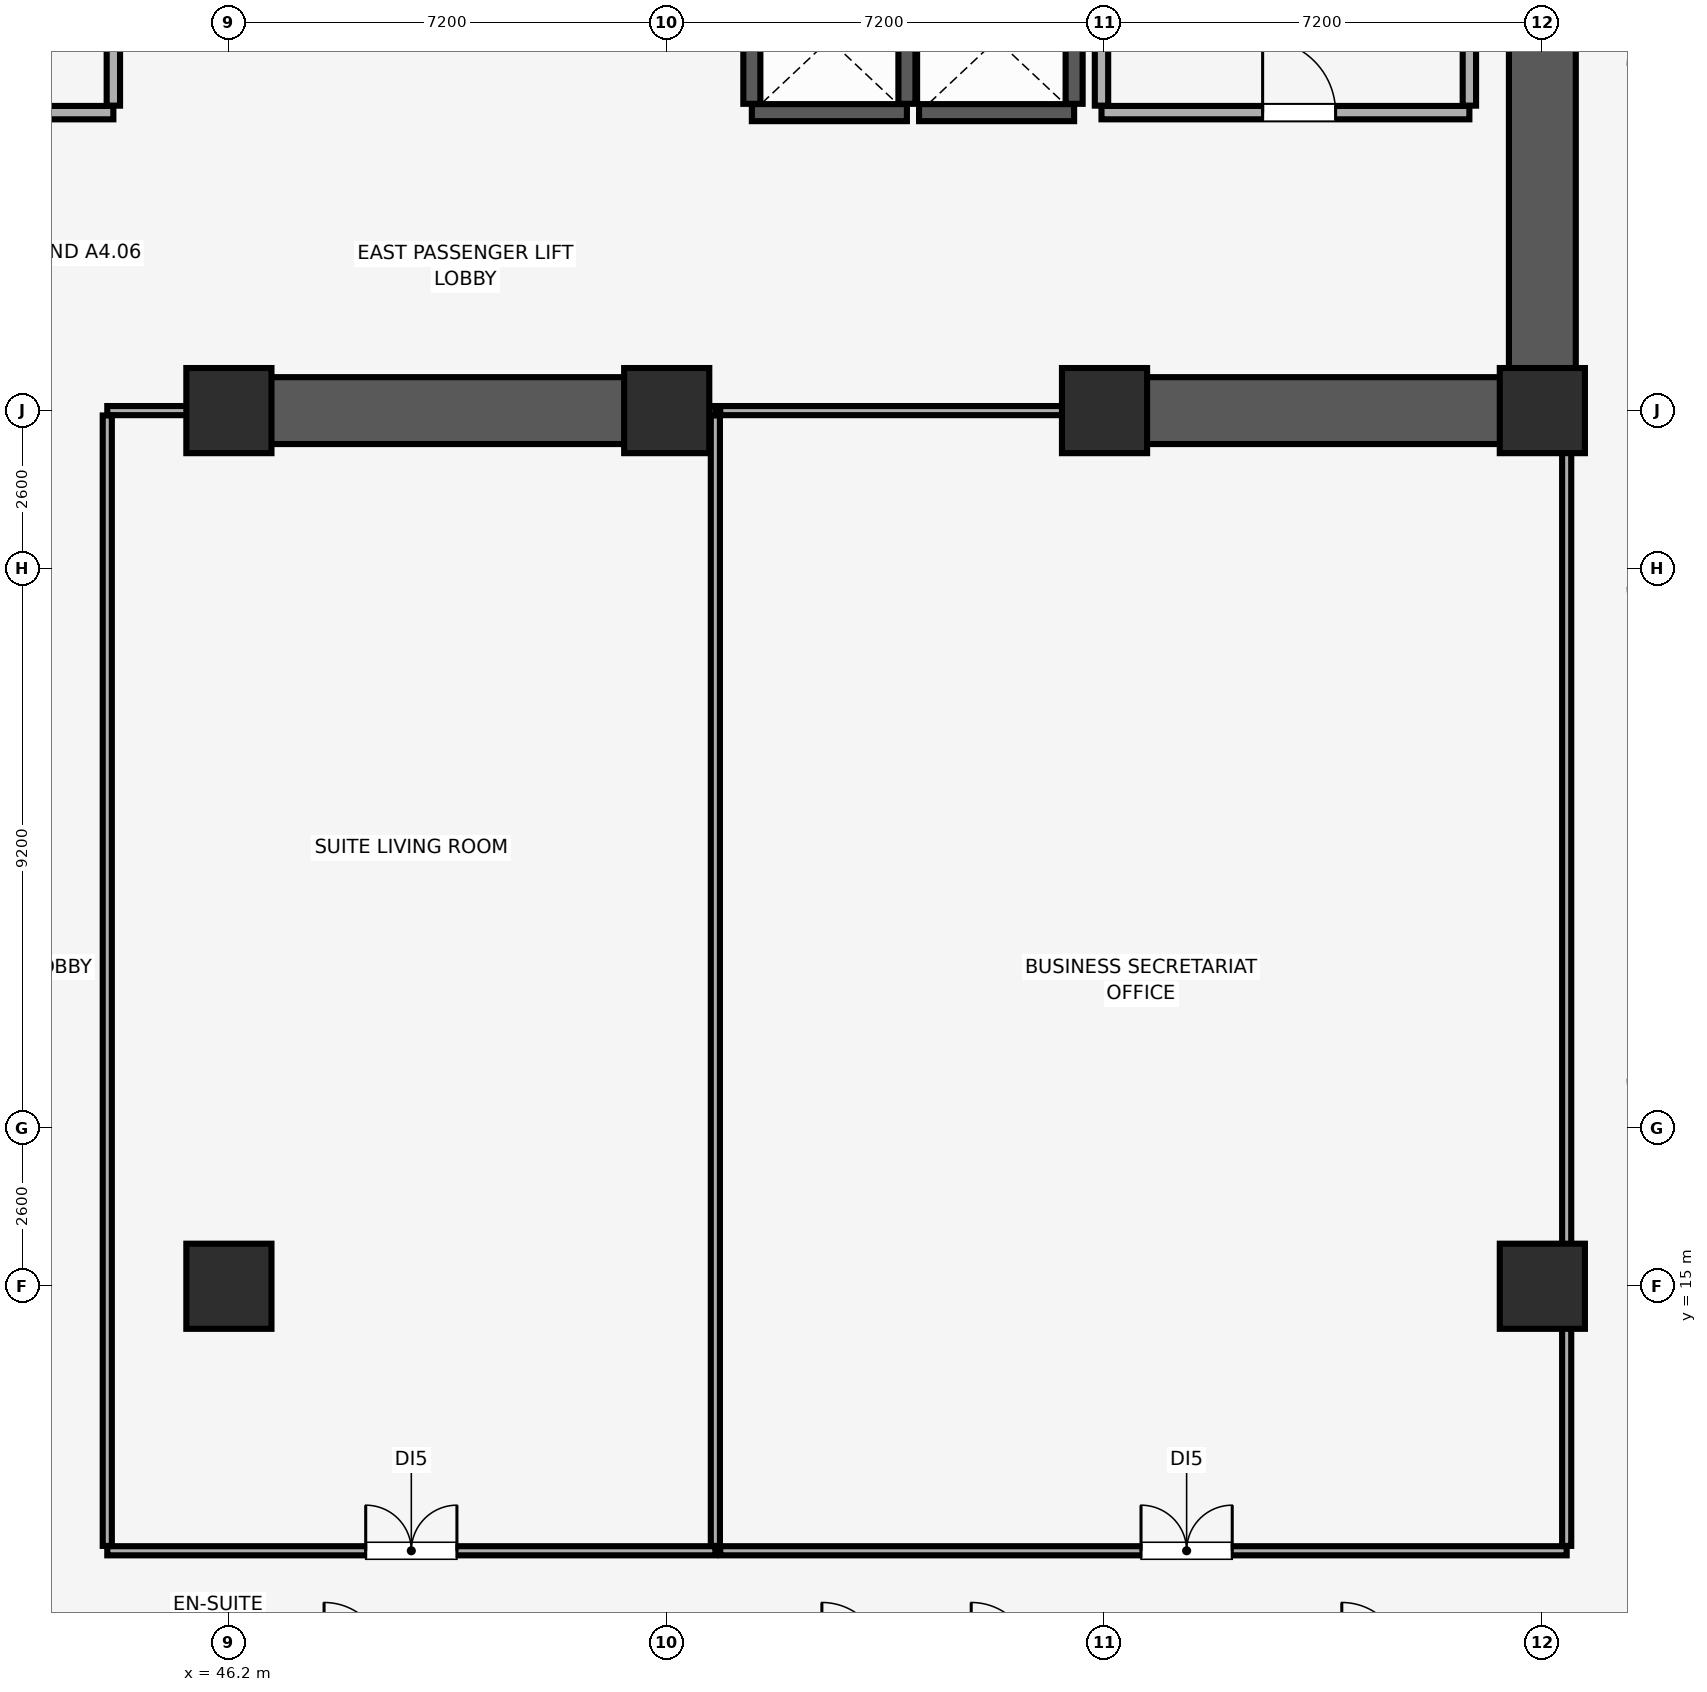
"""IFC4 building model, lengths in metres.
Left out: names, types, materials, properties, quantities, classifications, styles, units other than length and angle.
Written with IfcOpenShell. Run it as: python <this file> out.ifc"""

import sys

from ifc_helpers import new_model, si_unit, direction, frame, frame_2d, origin, origin_2d, place, context, subcontext, project, spatial, rectangle, extrude, element, fill, save


model = new_model("IFC4")
c1 = context("Model", 3, precision=1e-05, world=origin(), true_north=direction((0.0, 1.0)))
c2 = subcontext(c1, "Body", "Model", "MODEL_VIEW")
j1 = project(units=[si_unit("LENGTHUNIT", "METRE"), si_unit("PLANEANGLEUNIT", "RADIAN")], contexts=[c1])
p1 = place(None, origin())
s1 = spatial("IfcSite", under=j1, at=p1, CompositionType="ELEMENT")
p2 = place(p1, origin())
s2 = spatial("IfcBuilding", under=s1, at=p2, CompositionType="ELEMENT")
p3 = place(p2, frame((0.0, 0.0, 31.4)))
s3 = spatial("IfcBuildingStorey", under=s2, at=p3, CompositionType="ELEMENT", Elevation=31.4)
for number, where, z_axis, x_axis in (
    (1, (46.2, 15.0, 0.0), (0.0, 0.0, 1.0), (1.0, 0.0, 0.0)),
    (2, (67.8, 15.0, 0.0), (0.0, 0.0, 1.0), (1.0, 0.0, 0.0)),
    (3, (46.2, 29.4, 0.0), (0.0, 0.0, 1.0), (1.0, 0.0, 0.0)),
    (4, (53.4, 29.4, 0.0), (0.0, 0.0, 1.0), (1.0, 0.0, 0.0)),
    (5, (60.6, 29.4, 0.0), (0.0, 0.0, 1.0), (1.0, 0.0, 0.0)),
    (6, (67.8, 29.4, 0.0), (0.0, 0.0, 1.0), (1.0, 0.0, 0.0)),
):
    element("IfcColumn", number, at=place(p3, frame(where, z_axis=z_axis, x_axis=x_axis)), inside=s3, PredefinedType="COLUMN", context=c2, shape_type="SweptSolid", body=[
        extrude(rectangle(XDim=1.4, YDim=1.4, at=origin_2d()), origin(), (0.0, 0.0, 1.0), 3.51),
    ])
p4 = place(p3, frame((67.8, 29.4, 0.0), z_axis=(0.0, 0.0, 1.0), x_axis=(0.0, 1.0, 0.0)))
e7 = element("IfcWall", 7, at=p4, inside=s3, PredefinedType="SHEAR", context=c2, shape_type="SweptSolid", body=[
    extrude(rectangle(XDim=19.2, YDim=1.1, at=frame_2d((9.6, 0.0))), origin(), (0.0, 0.0, 1.0), 3.51),
])
p5 = place(p3, frame((46.0, 29.4, 0.0), z_axis=(0.0, 0.0, 1.0), x_axis=(1.0, 0.0, 0.0)))
e8 = element("IfcWall", 8, at=p5, inside=s3, PredefinedType="SHEAR", context=c2, shape_type="SweptSolid", body=[
    extrude(rectangle(XDim=7.6, YDim=1.1, at=frame_2d((3.8, 0.0))), origin(), (0.0, 0.0, 1.0), 3.51),
])
p6 = place(p3, frame((60.4, 29.4, 0.0), z_axis=(0.0, 0.0, 1.0), x_axis=(1.0, 0.0, 0.0)))
e9 = element("IfcWall", 9, at=p6, inside=s3, PredefinedType="SHEAR", context=c2, shape_type="SweptSolid", body=[
    extrude(rectangle(XDim=6.845, YDim=1.1, at=frame_2d((3.423, 0.0))), origin(), (0.0, 0.0, 1.0), 3.51),
])
p7 = place(p3, frame((54.8, 34.3, 0.0), z_axis=(0.0, 0.0, 1.0), x_axis=(1.0, 0.0, 0.0)))
e10 = element("IfcWall", 10, at=p7, inside=s3, PredefinedType="SHEAR", context=c2, shape_type="SweptSolid", body=[
    extrude(rectangle(XDim=2.55, YDim=0.28, at=frame_2d((1.275, 0.0))), origin(), (0.0, 0.0, 1.0), 3.51),
])
for number, where, z_axis, x_axis in (
    (11, (54.8, 34.445, 0.0), (0.0, 0.0, 1.0), (0.0, 1.0, 0.0)),
    (12, (57.35, 34.445, 0.0), (0.0, 0.0, 1.0), (0.0, 1.0, 0.0)),
):
    element("IfcWall", number, at=place(p3, frame(where, z_axis=z_axis, x_axis=x_axis)), inside=s3, PredefinedType="SHEAR", context=c2, shape_type="SweptSolid", body=[
        extrude(rectangle(XDim=2.11, YDim=0.28, at=frame_2d((1.055, 0.0))), origin(), (0.0, 0.0, 1.0), 3.51),
    ])
p8 = place(p3, frame((57.55, 34.3, 0.0), z_axis=(0.0, 0.0, 1.0), x_axis=(1.0, 0.0, 0.0)))
e13 = element("IfcWall", 13, at=p8, inside=s3, PredefinedType="SHEAR", context=c2, shape_type="SweptSolid", body=[
    extrude(rectangle(XDim=2.55, YDim=0.28, at=frame_2d((1.275, 0.0))), origin(), (0.0, 0.0, 1.0), 3.51),
])
p9 = place(p3, frame((60.1, 34.445, 0.0), z_axis=(0.0, 0.0, 1.0), x_axis=(0.0, 1.0, 0.0)))
e14 = element("IfcWall", 14, at=p9, inside=s3, PredefinedType="SHEAR", context=c2, shape_type="SweptSolid", body=[
    extrude(rectangle(XDim=2.11, YDim=0.28, at=frame_2d((1.055, 0.0))), origin(), (0.0, 0.0, 1.0), 3.51),
])
p10 = place(p3, frame((60.55, 34.3, 0.0), z_axis=(0.0, 0.0, 1.0), x_axis=(1.0, 0.0, 0.0)))
e15 = element("IfcWall", 15, at=p10, inside=s3, PredefinedType="PARTITIONING", context=c2, shape_type="SweptSolid", body=[
    extrude(rectangle(XDim=6.05, YDim=0.22, at=frame_2d((3.025, 0.0))), origin(), (0.0, 0.0, 1.0), 3.51),
])
p11 = place(p10, frame((2.65, 0.0, 0.0)))
e16 = element("IfcOpeningElement", 16, at=p11, cuts=e15, PredefinedType="OPENING", context=c2, shape_type="SweptSolid", body=[
    extrude(rectangle(XDim=1.2, YDim=2.15, at=frame_2d((0.6, 1.075))), frame((0.0, 0.12, 0.0), z_axis=(0.0, -1.0, 0.0), x_axis=(1.0, 0.0, 0.0)), (0.0, 0.0, 1.0), 0.24),
])
p12 = place(p3, frame((60.55, 34.415, 0.0), z_axis=(0.0, 0.0, 1.0), x_axis=(0.0, 1.0, 0.0)))
e17 = element("IfcWall", 17, at=p12, inside=s3, PredefinedType="PARTITIONING", context=c2, shape_type="SweptSolid", body=[
    extrude(rectangle(XDim=5.64, YDim=0.22, at=frame_2d((2.82, 0.0))), origin(), (0.0, 0.0, 1.0), 3.51),
])
p13 = place(p3, frame((66.6, 34.415, 0.0), z_axis=(0.0, 0.0, 1.0), x_axis=(0.0, 1.0, 0.0)))
e18 = element("IfcWall", 18, at=p13, inside=s3, PredefinedType="PARTITIONING", context=c2, shape_type="SweptSolid", body=[
    extrude(rectangle(XDim=5.43, YDim=0.22, at=frame_2d((2.715, 0.0))), origin(), (0.0, 0.0, 1.0), 3.51),
])
p14 = place(p3, frame((39.7, 34.3, 0.0), z_axis=(0.0, 0.0, 1.0), x_axis=(1.0, 0.0, 0.0)))
e19 = element("IfcWall", 19, at=p14, inside=s3, PredefinedType="PARTITIONING", context=c2, shape_type="SweptSolid", body=[
    extrude(rectangle(XDim=4.6, YDim=0.22, at=frame_2d((2.3, 0.0))), origin(), (0.0, 0.0, 1.0), 3.51),
])
p15 = place(p14, frame((1.7, 0.0, 0.0)))
e20 = element("IfcOpeningElement", 20, at=p15, cuts=e19, PredefinedType="OPENING", context=c2, shape_type="SweptSolid", body=[
    extrude(rectangle(XDim=1.2, YDim=2.15, at=frame_2d((0.6, 1.075))), frame((0.0, 0.12, 0.0), z_axis=(0.0, -1.0, 0.0), x_axis=(1.0, 0.0, 0.0)), (0.0, 0.0, 1.0), 0.24),
])
p16 = place(p3, frame((44.3, 34.415, 0.0), z_axis=(0.0, 0.0, 1.0), x_axis=(0.0, 1.0, 0.0)))
e21 = element("IfcWall", 21, at=p16, inside=s3, PredefinedType="PARTITIONING", context=c2, shape_type="SweptSolid", body=[
    extrude(rectangle(XDim=5.785, YDim=0.22, at=frame_2d((2.893, 0.0))), origin(), (0.0, 0.0, 1.0), 3.51),
])
p17 = place(p3, frame((44.2, 10.65, 0.0), z_axis=(0.0, 0.0, 1.0), x_axis=(1.0, 0.0, 0.0)))
e22 = element("IfcWall", 22, at=p17, inside=s3, PredefinedType="PARTITIONING", context=c2, shape_type="SweptSolid", body=[
    extrude(rectangle(XDim=10.0, YDim=0.15, at=frame_2d((5.0, 0.0))), origin(), (0.0, 0.0, 1.0), 3.51),
])
p18 = place(p17, frame((4.25, 0.0, 0.0)))
e23 = element("IfcOpeningElement", 23, at=p18, cuts=e22, PredefinedType="OPENING", context=c2, shape_type="SweptSolid", body=[
    extrude(rectangle(XDim=1.5, YDim=2.25, at=frame_2d((0.75, 1.125))), frame((0.0, 0.085, 0.0), z_axis=(0.0, -1.0, 0.0), x_axis=(1.0, 0.0, 0.0)), (0.0, 0.0, 1.0), 0.17),
])
p19 = place(p3, frame((44.2, 29.4, 0.0), z_axis=(0.0, 0.0, 1.0), x_axis=(1.0, 0.0, 0.0)))
e24 = element("IfcWall", 24, at=p19, inside=s3, PredefinedType="PARTITIONING", context=c2, shape_type="SweptSolid", body=[
    extrude(rectangle(XDim=1.79, YDim=0.15, at=frame_2d((0.895, 0.0))), origin(), (0.0, 0.0, 1.0), 2.41),
])
p20 = place(p3, frame((53.61, 29.4, 0.0), z_axis=(0.0, 0.0, 1.0), x_axis=(1.0, 0.0, 0.0)))
e25 = element("IfcWall", 25, at=p20, inside=s3, PredefinedType="PARTITIONING", context=c2, shape_type="SweptSolid", body=[
    extrude(rectangle(XDim=0.59, YDim=0.15, at=frame_2d((0.295, 0.0))), origin(), (0.0, 0.0, 1.0), 2.41),
])
for number, where, z_axis, x_axis in (
    (26, (44.2, 10.73, 0.0), (0.0, 0.0, 1.0), (0.0, 1.0, 0.0)),
    (27, (54.2, 10.73, 0.0), (0.0, 0.0, 1.0), (0.0, 1.0, 0.0)),
):
    element("IfcWall", number, at=place(p3, frame(where, z_axis=z_axis, x_axis=x_axis)), inside=s3, PredefinedType="PARTITIONING", context=c2, shape_type="SweptSolid", body=[
        extrude(rectangle(XDim=18.59, YDim=0.15, at=frame_2d((9.295, 0.0))), origin(), (0.0, 0.0, 1.0), 3.51),
    ])
p21 = place(p3, frame((54.28, 10.65, 0.0), z_axis=(0.0, 0.0, 1.0), x_axis=(1.0, 0.0, 0.0)))
e28 = element("IfcWall", 28, at=p21, inside=s3, PredefinedType="PARTITIONING", context=c2, shape_type="SweptSolid", body=[
    extrude(rectangle(XDim=13.92, YDim=0.15, at=frame_2d((6.96, 0.0))), origin(), (0.0, 0.0, 1.0), 3.51),
])
p22 = place(p21, frame((6.92, 0.0, 0.0)))
e29 = element("IfcOpeningElement", 29, at=p22, cuts=e28, PredefinedType="OPENING", context=c2, shape_type="SweptSolid", body=[
    extrude(rectangle(XDim=1.5, YDim=2.25, at=frame_2d((0.75, 1.125))), frame((0.0, 0.085, 0.0), z_axis=(0.0, -1.0, 0.0), x_axis=(1.0, 0.0, 0.0)), (0.0, 0.0, 1.0), 0.17),
])
p23 = place(p3, frame((54.28, 29.4, 0.0), z_axis=(0.0, 0.0, 1.0), x_axis=(1.0, 0.0, 0.0)))
e30 = element("IfcWall", 30, at=p23, inside=s3, PredefinedType="PARTITIONING", context=c2, shape_type="SweptSolid", body=[
    extrude(rectangle(XDim=6.11, YDim=0.15, at=frame_2d((3.055, 0.0))), origin(), (0.0, 0.0, 1.0), 2.41),
])
p24 = place(p3, frame((68.2, 10.73, 0.0), z_axis=(0.0, 0.0, 1.0), x_axis=(0.0, 1.0, 0.0)))
e31 = element("IfcWall", 31, at=p24, inside=s3, PredefinedType="PARTITIONING", context=c2, shape_type="SweptSolid", body=[
    extrude(rectangle(XDim=18.66, YDim=0.15, at=frame_2d((9.33, 0.0))), origin(), (0.0, 0.0, 1.0), 3.51),
])
p25 = place(p11, origin())
e32 = element("IfcDoor", 32, at=p25, inside=s3, OperationType="SINGLE_SWING_LEFT", PredefinedType="DOOR", context=c2, shape_type="SweptSolid", body=[
    extrude(rectangle(XDim=1.2, YDim=2.15, at=frame_2d((0.6, 1.075))), frame((0.0, 0.025, 0.0), z_axis=(0.0, -1.0, 0.0), x_axis=(1.0, 0.0, 0.0)), (0.0, 0.0, 1.0), 0.05),
])
fill(e16, e32)
p26 = place(p18, origin())
e33 = element("IfcDoor", 33, at=p26, inside=s3, OperationType="DOUBLE_DOOR_SINGLE_SWING", PredefinedType="DOOR", context=c2, shape_type="SweptSolid", body=[
    extrude(rectangle(XDim=1.5, YDim=2.25, at=frame_2d((0.75, 1.125))), frame((0.0, 0.025, 0.0), z_axis=(0.0, -1.0, 0.0), x_axis=(1.0, 0.0, 0.0)), (0.0, 0.0, 1.0), 0.05),
])
fill(e23, e33)
p27 = place(p22, origin())
e34 = element("IfcDoor", 34, at=p27, inside=s3, OperationType="DOUBLE_DOOR_SINGLE_SWING", PredefinedType="DOOR", context=c2, shape_type="SweptSolid", body=[
    extrude(rectangle(XDim=1.5, YDim=2.25, at=frame_2d((0.75, 1.125))), frame((0.0, 0.025, 0.0), z_axis=(0.0, -1.0, 0.0), x_axis=(1.0, 0.0, 0.0)), (0.0, 0.0, 1.0), 0.05),
])
fill(e29, e34)
save(model, sys.argv[1])
